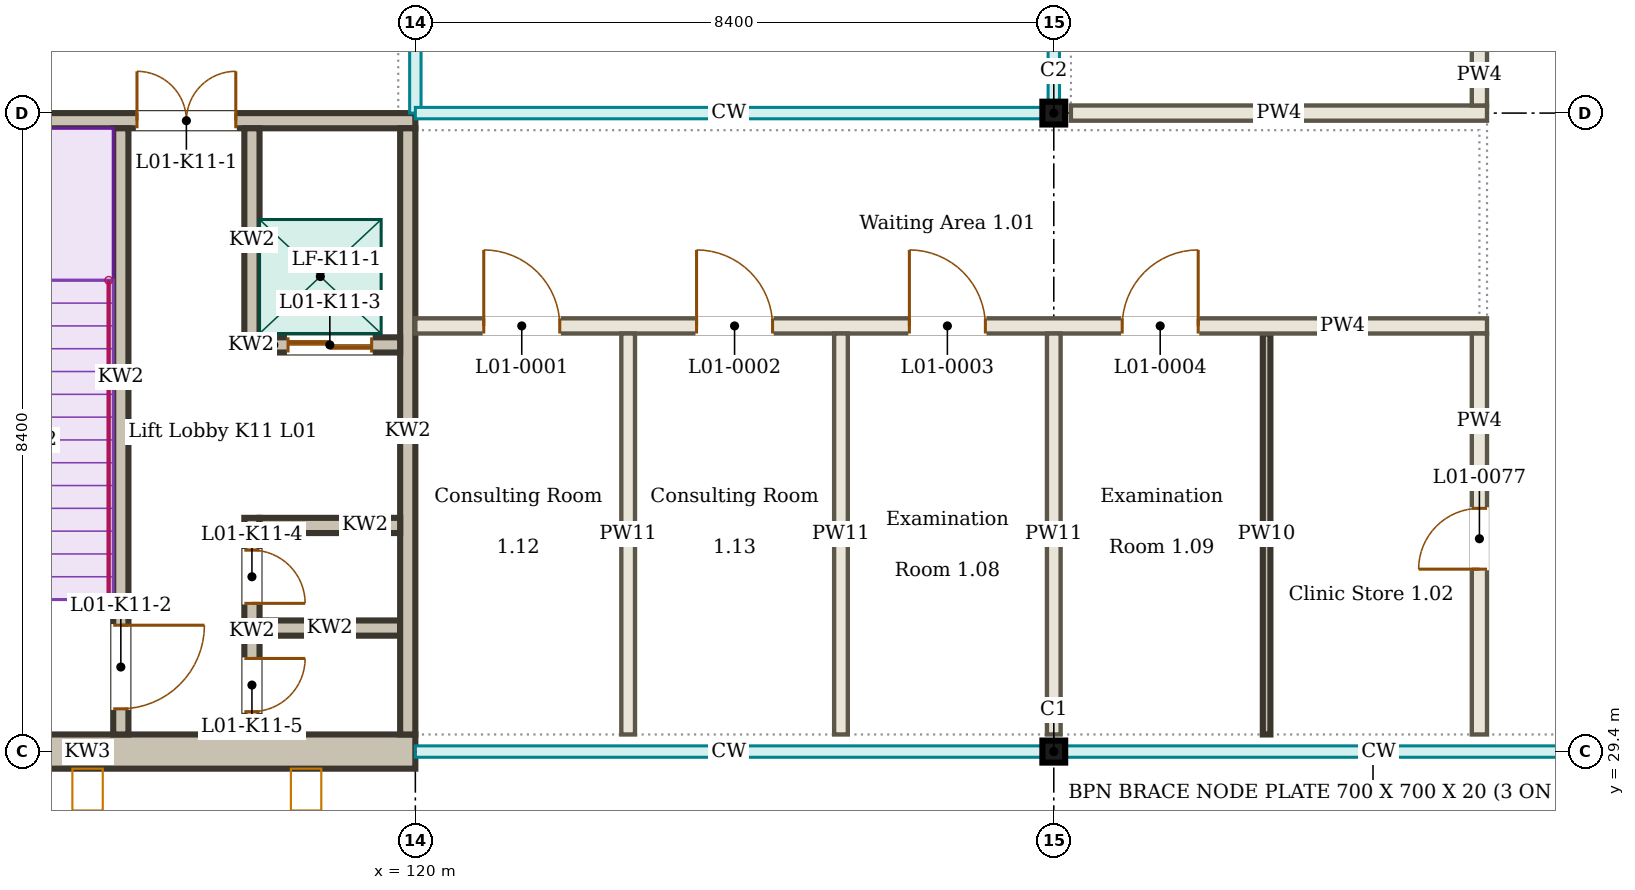
"""IFC4 building model, lengths in metres.
Left out: names, types, materials, properties, quantities, classifications, styles, units other than length and angle.
Written with IfcOpenShell. Run it as: python <this file> out.ifc"""

import sys

from ifc_helpers import new_model, si_unit, direction, frame, frame_2d, origin, origin_2d, place, context, subcontext, project, spatial, rectangle, i_section, extrude, element, fill, save


model = new_model("IFC4")
c1 = context("Model", 3, precision=1e-05, world=origin(), true_north=direction((0.0, 1.0)))
c2 = subcontext(c1, "Body", "Model", "MODEL_VIEW")
j1 = project(units=[si_unit("LENGTHUNIT", "METRE"), si_unit("PLANEANGLEUNIT", "RADIAN")], contexts=[c1])
p1 = place(None, origin())
s1 = spatial("IfcSite", under=j1, at=p1, CompositionType="ELEMENT")
p2 = place(p1, origin())
s2 = spatial("IfcBuilding", under=s1, at=p2, CompositionType="ELEMENT")
p3 = place(p2, frame((0.0, 0.0, 4.5)))
s3 = spatial("IfcBuildingStorey", under=s2, at=p3, CompositionType="ELEMENT", Elevation=4.5)
p4 = place(p3, frame((128.4, 29.4, 0.0), z_axis=(0.0, 0.0, 1.0), x_axis=(1.0, 0.0, 0.0)))
e1 = element("IfcColumn", 1, at=p4, inside=s3, PredefinedType="COLUMN", context=c2, shape_type="SweptSolid", body=[
    extrude(i_section(OverallWidth=0.3, OverallDepth=0.29, WebThickness=0.009, FlangeThickness=0.014, FilletRadius=0.027, at=origin_2d()), origin(), (0.0, 0.0, 1.0), 4.5),
])
p5 = place(p3, frame((128.4, 37.8, 0.0), z_axis=(0.0, 0.0, 1.0), x_axis=(1.0, 0.0, 0.0)))
e2 = element("IfcColumn", 2, at=p5, inside=s3, PredefinedType="COLUMN", context=c2, shape_type="SweptSolid", body=[
    extrude(i_section(OverallWidth=0.3, OverallDepth=0.3, WebThickness=0.011, FlangeThickness=0.019, FilletRadius=0.027, at=origin_2d()), origin(), (0.0, 0.0, 1.0), 4.5),
])
p6 = place(p3, frame((120.0, 35.0, 0.0), z_axis=(0.0, 0.0, 1.0), x_axis=(1.0, 0.0, 0.0)))
e3 = element("IfcWall", 3, at=p6, inside=s3, PredefinedType="PARTITIONING", context=c2, shape_type="SweptSolid", body=[
    extrude(rectangle(XDim=14.1, YDim=0.2, at=frame_2d((7.05, 0.0))), origin(), (0.0, 0.0, 1.0), 3.9),
])
p7 = place(p6, frame((0.9, 0.0, 0.0)))
e4 = element("IfcOpeningElement", 4, at=p7, cuts=e3, PredefinedType="OPENING", context=c2, shape_type="SweptSolid", body=[
    extrude(rectangle(XDim=1.0, YDim=2.1, at=frame_2d((0.5, 1.05))), frame((0.0, 0.11, 0.0), z_axis=(0.0, -1.0, 0.0), x_axis=(1.0, 0.0, 0.0)), (0.0, 0.0, 1.0), 0.22),
])
p8 = place(p6, frame((3.7, 0.0, 0.0)))
e5 = element("IfcOpeningElement", 5, at=p8, cuts=e3, PredefinedType="OPENING", context=c2, shape_type="SweptSolid", body=[
    extrude(rectangle(XDim=1.0, YDim=2.1, at=frame_2d((0.5, 1.05))), frame((0.0, 0.11, 0.0), z_axis=(0.0, -1.0, 0.0), x_axis=(1.0, 0.0, 0.0)), (0.0, 0.0, 1.0), 0.22),
])
p9 = place(p6, frame((6.5, 0.0, 0.0)))
e6 = element("IfcOpeningElement", 6, at=p9, cuts=e3, PredefinedType="OPENING", context=c2, shape_type="SweptSolid", body=[
    extrude(rectangle(XDim=1.0, YDim=2.1, at=frame_2d((0.5, 1.05))), frame((0.0, 0.11, 0.0), z_axis=(0.0, -1.0, 0.0), x_axis=(1.0, 0.0, 0.0)), (0.0, 0.0, 1.0), 0.22),
])
p10 = place(p6, frame((9.3, 0.0, 0.0)))
e7 = element("IfcOpeningElement", 7, at=p10, cuts=e3, PredefinedType="OPENING", context=c2, shape_type="SweptSolid", body=[
    extrude(rectangle(XDim=1.0, YDim=2.1, at=frame_2d((0.5, 1.05))), frame((0.0, 0.11, 0.0), z_axis=(0.0, -1.0, 0.0), x_axis=(1.0, 0.0, 0.0)), (0.0, 0.0, 1.0), 0.22),
])
p11 = place(p3, frame((128.625, 37.8, 0.0), z_axis=(0.0, 0.0, 1.0), x_axis=(1.0, 0.0, 0.0)))
e8 = element("IfcWall", 8, at=p11, inside=s3, PredefinedType="PARTITIONING", context=c2, shape_type="SweptSolid", body=[
    extrude(rectangle(XDim=5.475, YDim=0.2, at=frame_2d((2.738, 0.0))), origin(), (0.0, 0.0, 1.0), 3.9),
])
for number, where, z_axis, x_axis in (
    (9, (122.8, 29.625, 0.0), (0.0, 0.0, 1.0), (0.0, 1.0, 0.0)),
    (10, (125.6, 29.625, 0.0), (0.0, 0.0, 1.0), (0.0, 1.0, 0.0)),
):
    element("IfcWall", number, at=place(p3, frame(where, z_axis=z_axis, x_axis=x_axis)), inside=s3, PredefinedType="PARTITIONING", context=c2, shape_type="SweptSolid", body=[
        extrude(rectangle(XDim=5.275, YDim=0.18, at=frame_2d((2.637, 0.0))), origin(), (0.0, 0.0, 1.0), 3.996),
    ])
p12 = place(p3, frame((128.4, 29.625, 0.0), z_axis=(0.0, 0.0, 1.0), x_axis=(0.0, 1.0, 0.0)))
e11 = element("IfcWall", 11, at=p12, inside=s3, PredefinedType="PARTITIONING", context=c2, shape_type="SweptSolid", body=[
    extrude(rectangle(XDim=5.275, YDim=0.18, at=frame_2d((2.637, 0.0))), origin(), (0.0, 0.0, 1.0), 3.9),
])
p13 = place(p3, frame((131.2, 29.625, 0.0), z_axis=(0.0, 0.0, 1.0), x_axis=(0.0, 1.0, 0.0)))
e12 = element("IfcWall", 12, at=p13, inside=s3, PredefinedType="SOLIDWALL", context=c2, shape_type="SweptSolid", body=[
    extrude(rectangle(XDim=5.275, YDim=0.1, at=frame_2d((2.637, 0.0))), origin(), (0.0, 0.0, 1.0), 3.996),
])
p14 = place(p3, frame((134.0, 29.625, 0.0), z_axis=(0.0, 0.0, 1.0), x_axis=(0.0, 1.0, 0.0)))
e13 = element("IfcWall", 13, at=p14, inside=s3, PredefinedType="PARTITIONING", context=c2, shape_type="SweptSolid", body=[
    extrude(rectangle(XDim=5.275, YDim=0.2, at=frame_2d((2.637, 0.0))), origin(), (0.0, 0.0, 1.0), 3.996),
])
p15 = place(p14, frame((2.175, 0.0, 0.0)))
e14 = element("IfcOpeningElement", 14, at=p15, cuts=e13, PredefinedType="OPENING", context=c2, shape_type="SweptSolid", body=[
    extrude(rectangle(XDim=0.8, YDim=2.1, at=frame_2d((0.4, 1.05))), frame((0.0, 0.11, 0.0), z_axis=(0.0, -1.0, 0.0), x_axis=(1.0, 0.0, 0.0)), (0.0, 0.0, 1.0), 0.22),
])
p16 = place(p3, frame((134.0, 37.9, 0.0), z_axis=(0.0, 0.0, 1.0), x_axis=(0.0, 1.0, 0.0)))
e15 = element("IfcWall", 15, at=p16, inside=s3, PredefinedType="PARTITIONING", context=c2, shape_type="SweptSolid", body=[
    extrude(rectangle(XDim=2.6, YDim=0.2, at=frame_2d((1.3, 0.0))), origin(), (0.0, 0.0, 1.0), 3.996),
])
p17 = place(p16, frame((0.8, 0.0, 0.0)))
e16 = element("IfcOpeningElement", 16, at=p17, cuts=e15, PredefinedType="OPENING", context=c2, shape_type="SweptSolid", body=[
    extrude(rectangle(XDim=1.0, YDim=2.1, at=frame_2d((0.5, 1.05))), frame((0.0, 0.11, 0.0), z_axis=(0.0, -1.0, 0.0), x_axis=(1.0, 0.0, 0.0)), (0.0, 0.0, 1.0), 0.22),
])
p18 = place(p3, frame((111.825, 37.7, 0.0), z_axis=(0.0, 0.0, 1.0), x_axis=(1.0, 0.0, 0.0)))
e17 = element("IfcWall", 17, at=p18, inside=s3, PredefinedType="SOLIDWALL", context=c2, shape_type="SweptSolid", body=[
    extrude(rectangle(XDim=8.175, YDim=0.2, at=frame_2d((4.087, 0.0))), origin(), (0.0, 0.0, 1.0), 4.5),
])
p19 = place(p18, frame((4.512, 0.0, 0.0)))
e18 = element("IfcOpeningElement", 18, at=p19, cuts=e17, PredefinedType="OPENING", context=c2, shape_type="SweptSolid", body=[
    extrude(rectangle(XDim=1.3, YDim=2.1, at=frame_2d((0.65, 1.05))), frame((0.0, 0.11, 0.0), z_axis=(0.0, -1.0, 0.0), x_axis=(1.0, 0.0, 0.0)), (0.0, 0.0, 1.0), 0.22),
])
p20 = place(p3, frame((111.375, 29.4, 0.0), z_axis=(0.0, 0.0, 1.0), x_axis=(1.0, 0.0, 0.0)))
e19 = element("IfcWall", 19, at=p20, inside=s3, PredefinedType="SOLIDWALL", context=c2, shape_type="SweptSolid", body=[
    extrude(rectangle(XDim=8.625, YDim=0.45, at=frame_2d((4.312, 0.0))), origin(), (0.0, 0.0, 1.0), 4.5),
])
p21 = place(p3, frame((119.9, 37.6, 0.0), z_axis=(0.0, 0.0, 1.0), x_axis=(0.0, -1.0, 0.0)))
e20 = element("IfcWall", 20, at=p21, inside=s3, PredefinedType="SOLIDWALL", context=c2, shape_type="SweptSolid", body=[
    extrude(rectangle(XDim=7.975, YDim=0.2, at=frame_2d((3.988, 0.0))), origin(), (0.0, 0.0, 1.0), 4.5),
])
p22 = place(p3, frame((116.125, 37.6, 0.0), z_axis=(0.0, 0.0, 1.0), x_axis=(0.0, -1.0, 0.0)))
e21 = element("IfcWall", 21, at=p22, inside=s3, PredefinedType="SOLIDWALL", context=c2, shape_type="SweptSolid", body=[
    extrude(rectangle(XDim=7.975, YDim=0.2, at=frame_2d((3.988, 0.0))), origin(), (0.0, 0.0, 1.0), 4.5),
])
p23 = place(p22, frame((6.538, 0.0, 0.0)))
e22 = element("IfcOpeningElement", 22, at=p23, cuts=e21, PredefinedType="OPENING", context=c2, shape_type="SweptSolid", body=[
    extrude(rectangle(XDim=1.1, YDim=2.1, at=frame_2d((0.55, 1.05))), frame((0.0, 0.11, 0.0), z_axis=(0.0, -1.0, 0.0), x_axis=(1.0, 0.0, 0.0)), (0.0, 0.0, 1.0), 0.22),
])
p24 = place(p3, frame((117.85, 37.6, 0.0), z_axis=(0.0, 0.0, 1.0), x_axis=(0.0, -1.0, 0.0)))
e23 = element("IfcWall", 23, at=p24, inside=s3, PredefinedType="SOLIDWALL", context=c2, shape_type="SweptSolid", body=[
    extrude(rectangle(XDim=2.95, YDim=0.2, at=frame_2d((1.475, 0.0))), origin(), (0.0, 0.0, 1.0), 4.5),
])
p25 = place(p3, frame((117.85, 32.475, 0.0), z_axis=(0.0, 0.0, 1.0), x_axis=(0.0, -1.0, 0.0)))
e24 = element("IfcWall", 24, at=p25, inside=s3, PredefinedType="SOLIDWALL", context=c2, shape_type="SweptSolid", body=[
    extrude(rectangle(XDim=2.85, YDim=0.2, at=frame_2d((1.425, 0.0))), origin(), (0.0, 0.0, 1.0), 4.3),
])
p26 = place(p25, frame((0.425, 0.0, 0.0)))
e25 = element("IfcOpeningElement", 25, at=p26, cuts=e24, PredefinedType="OPENING", context=c2, shape_type="SweptSolid", body=[
    extrude(rectangle(XDim=0.7, YDim=2.1, at=frame_2d((0.35, 1.05))), frame((0.0, 0.11, 0.0), z_axis=(0.0, -1.0, 0.0), x_axis=(1.0, 0.0, 0.0)), (0.0, 0.0, 1.0), 0.22),
])
p27 = place(p25, frame((1.85, 0.0, 0.0)))
e26 = element("IfcOpeningElement", 26, at=p27, cuts=e24, PredefinedType="OPENING", context=c2, shape_type="SweptSolid", body=[
    extrude(rectangle(XDim=0.7, YDim=2.1, at=frame_2d((0.35, 1.05))), frame((0.0, 0.11, 0.0), z_axis=(0.0, -1.0, 0.0), x_axis=(1.0, 0.0, 0.0)), (0.0, 0.0, 1.0), 0.22),
])
p28 = place(p3, frame((117.95, 34.75, 0.0), z_axis=(0.0, 0.0, 1.0), x_axis=(1.0, 0.0, 0.0)))
e27 = element("IfcWall", 27, at=p28, inside=s3, PredefinedType="SOLIDWALL", context=c2, shape_type="SweptSolid", body=[
    extrude(rectangle(XDim=1.85, YDim=0.2, at=frame_2d((0.925, 0.0))), origin(), (0.0, 0.0, 1.0), 4.5),
])
p29 = place(p28, frame((0.375, 0.0, 0.0)))
e28 = element("IfcOpeningElement", 28, at=p29, cuts=e27, PredefinedType="OPENING", context=c2, shape_type="SweptSolid", body=[
    extrude(rectangle(XDim=1.1, YDim=2.1, at=frame_2d((0.55, 1.05))), frame((0.0, 0.11, 0.0), z_axis=(0.0, -1.0, 0.0), x_axis=(1.0, 0.0, 0.0)), (0.0, 0.0, 1.0), 0.22),
])
for number, where, z_axis, x_axis in (
    (29, (117.95, 32.375, 0.0), (0.0, 0.0, 1.0), (1.0, 0.0, 0.0)),
    (30, (117.95, 31.025, 0.0), (0.0, 0.0, 1.0), (1.0, 0.0, 0.0)),
):
    element("IfcWall", number, at=place(p3, frame(where, z_axis=z_axis, x_axis=x_axis)), inside=s3, PredefinedType="SOLIDWALL", context=c2, shape_type="SweptSolid", body=[
        extrude(rectangle(XDim=1.85, YDim=0.2, at=frame_2d((0.925, 0.0))), origin(), (0.0, 0.0, 1.0), 4.3),
    ])
p30 = place(p7, origin())
e31 = element("IfcDoor", 31, at=p30, inside=s3, OperationType="SINGLE_SWING_LEFT", PredefinedType="DOOR", context=c2, shape_type="SweptSolid", body=[
    extrude(rectangle(XDim=1.0, YDim=2.1, at=frame_2d((0.5, 1.05))), frame((0.0, 0.025, 0.0), z_axis=(0.0, -1.0, 0.0), x_axis=(1.0, 0.0, 0.0)), (0.0, 0.0, 1.0), 0.05),
])
fill(e4, e31)
p31 = place(p8, origin())
e32 = element("IfcDoor", 32, at=p31, inside=s3, OperationType="SINGLE_SWING_LEFT", PredefinedType="DOOR", context=c2, shape_type="SweptSolid", body=[
    extrude(rectangle(XDim=1.0, YDim=2.1, at=frame_2d((0.5, 1.05))), frame((0.0, 0.025, 0.0), z_axis=(0.0, -1.0, 0.0), x_axis=(1.0, 0.0, 0.0)), (0.0, 0.0, 1.0), 0.05),
])
fill(e5, e32)
p32 = place(p9, origin())
e33 = element("IfcDoor", 33, at=p32, inside=s3, OperationType="SINGLE_SWING_LEFT", PredefinedType="DOOR", context=c2, shape_type="SweptSolid", body=[
    extrude(rectangle(XDim=1.0, YDim=2.1, at=frame_2d((0.5, 1.05))), frame((0.0, 0.025, 0.0), z_axis=(0.0, -1.0, 0.0), x_axis=(1.0, 0.0, 0.0)), (0.0, 0.0, 1.0), 0.05),
])
fill(e6, e33)
p33 = place(p10, origin())
e34 = element("IfcDoor", 34, at=p33, inside=s3, OperationType="SINGLE_SWING_RIGHT", PredefinedType="DOOR", context=c2, shape_type="SweptSolid", body=[
    extrude(rectangle(XDim=1.0, YDim=2.1, at=frame_2d((0.5, 1.05))), frame((0.0, 0.025, 0.0), z_axis=(0.0, -1.0, 0.0), x_axis=(1.0, 0.0, 0.0)), (0.0, 0.0, 1.0), 0.05),
])
fill(e7, e34)
p34 = place(p15, origin())
e35 = element("IfcDoor", 35, at=p34, inside=s3, OperationType="SINGLE_SWING_LEFT", PredefinedType="DOOR", context=c2, shape_type="SweptSolid", body=[
    extrude(rectangle(XDim=0.8, YDim=2.1, at=frame_2d((0.4, 1.05))), frame((0.0, 0.025, 0.0), z_axis=(0.0, -1.0, 0.0), x_axis=(1.0, 0.0, 0.0)), (0.0, 0.0, 1.0), 0.05),
])
fill(e14, e35)
p35 = place(p19, origin())
e36 = element("IfcDoor", 36, at=p35, inside=s3, OperationType="DOUBLE_DOOR_DOUBLE_SWING", PredefinedType="DOOR", context=c2, shape_type="SweptSolid", body=[
    extrude(rectangle(XDim=1.3, YDim=2.1, at=frame_2d((0.65, 1.05))), frame((0.0, 0.025, 0.0), z_axis=(0.0, -1.0, 0.0), x_axis=(1.0, 0.0, 0.0)), (0.0, 0.0, 1.0), 0.05),
])
fill(e18, e36)
p36 = place(p23, origin())
e37 = element("IfcDoor", 37, at=p36, inside=s3, OperationType="SINGLE_SWING_LEFT", PredefinedType="DOOR", context=c2, shape_type="SweptSolid", body=[
    extrude(rectangle(XDim=1.1, YDim=2.1, at=frame_2d((0.55, 1.05))), frame((0.0, 0.025, 0.0), z_axis=(0.0, -1.0, 0.0), x_axis=(1.0, 0.0, 0.0)), (0.0, 0.0, 1.0), 0.05),
])
fill(e22, e37)
p37 = place(p29, origin())
e38 = element("IfcDoor", 38, at=p37, inside=s3, OperationType="DOUBLE_DOOR_SLIDING", PredefinedType="DOOR", context=c2, shape_type="SweptSolid", body=[
    extrude(rectangle(XDim=1.1, YDim=2.1, at=frame_2d((0.55, 1.05))), frame((0.0, 0.025, 0.0), z_axis=(0.0, -1.0, 0.0), x_axis=(1.0, 0.0, 0.0)), (0.0, 0.0, 1.0), 0.05),
])
fill(e28, e38)
p38 = place(p26, origin())
e39 = element("IfcDoor", 39, at=p38, inside=s3, OperationType="SINGLE_SWING_RIGHT", PredefinedType="DOOR", context=c2, shape_type="SweptSolid", body=[
    extrude(rectangle(XDim=0.7, YDim=2.1, at=frame_2d((0.35, 1.05))), frame((0.0, 0.025, 0.0), z_axis=(0.0, -1.0, 0.0), x_axis=(1.0, 0.0, 0.0)), (0.0, 0.0, 1.0), 0.05),
])
fill(e25, e39)
p39 = place(p27, origin())
e40 = element("IfcDoor", 40, at=p39, inside=s3, OperationType="SINGLE_SWING_LEFT", PredefinedType="DOOR", context=c2, shape_type="SweptSolid", body=[
    extrude(rectangle(XDim=0.7, YDim=2.1, at=frame_2d((0.35, 1.05))), frame((0.0, 0.025, 0.0), z_axis=(0.0, -1.0, 0.0), x_axis=(1.0, 0.0, 0.0)), (0.0, 0.0, 1.0), 0.05),
])
fill(e26, e40)
save(model, sys.argv[1])
